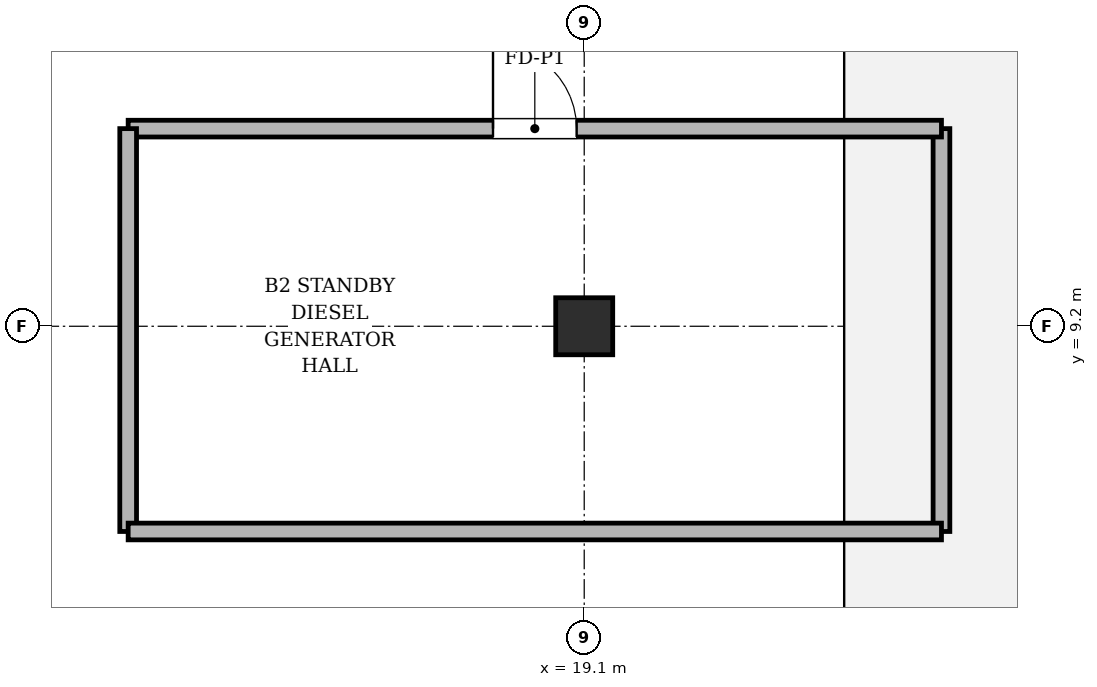
"""IFC4 building model, lengths in metres.
Left out: names, types, materials, properties, quantities, classifications, styles, units other than length and angle.
Written with IfcOpenShell. Run it as: python <this file> out.ifc"""

import sys

from ifc_helpers import new_model, si_unit, direction, frame, frame_2d, origin, origin_2d, place, context, subcontext, project, spatial, rectangle, circle, extrude, element, fill, save


model = new_model("IFC4")
c1 = context("Model", 3, precision=1e-05, world=origin(), true_north=direction((0.0, 1.0)))
c2 = subcontext(c1, "Body", "Model", "MODEL_VIEW")
j1 = project(units=[si_unit("LENGTHUNIT", "METRE"), si_unit("PLANEANGLEUNIT", "RADIAN")], contexts=[c1])
p1 = place(None, origin())
s1 = spatial("IfcSite", under=j1, at=p1, CompositionType="ELEMENT")
p2 = place(p1, origin())
s2 = spatial("IfcBuilding", under=s1, at=p2, CompositionType="ELEMENT")
p3 = place(p2, frame((0.0, 0.0, -9.6)))
s3 = spatial("IfcBuildingStorey", under=s2, at=p3, CompositionType="ELEMENT", Elevation=-9.6)
p4 = place(p3, frame((19.1, 9.2, 0.0), z_axis=(0.0, 0.0, 1.0), x_axis=(1.0, 0.0, 0.0)))
e1 = element("IfcColumn", 1, at=p4, inside=s3, PredefinedType="PILASTER", context=c2, shape_type="SweptSolid", body=[
    extrude(circle(Radius=0.375, at=origin_2d()), origin(), (0.0, 0.0, 1.0), 4.8),
])
p5 = place(p3, frame((23.8, 6.5, 0.0), z_axis=(0.0, 0.0, 1.0), x_axis=(0.0, 1.0, 0.0)))
e2 = element("IfcWall", 2, at=p5, inside=s3, PredefinedType="SOLIDWALL", context=c2, shape_type="SweptSolid", body=[
    extrude(rectangle(XDim=5.3, YDim=0.22, at=frame_2d((2.65, 0.0))), origin(), (0.0, 0.0, 1.0), 3.814),
])
p6 = place(p3, frame((23.8, 11.8, 0.0), z_axis=(0.0, 0.0, 1.0), x_axis=(-1.0, 0.0, 0.0)))
e3 = element("IfcWall", 3, at=p6, inside=s3, PredefinedType="SOLIDWALL", context=c2, shape_type="SweptSolid", body=[
    extrude(rectangle(XDim=10.7, YDim=0.22, at=frame_2d((5.35, 0.0))), origin(), (0.0, 0.0, 1.0), 3.814),
])
p7 = place(p6, frame((4.8, 0.0, 0.0)))
e4 = element("IfcOpeningElement", 4, at=p7, cuts=e3, PredefinedType="OPENING", context=c2, shape_type="SweptSolid", body=[
    extrude(rectangle(XDim=1.1, YDim=2.2, at=frame_2d((0.55, 1.1))), frame((0.0, 0.12, 0.0), z_axis=(0.0, -1.0, 0.0), x_axis=(1.0, 0.0, 0.0)), (0.0, 0.0, 1.0), 0.24),
])
p8 = place(p3, frame((13.1, 11.8, 0.0), z_axis=(0.0, 0.0, 1.0), x_axis=(0.0, -1.0, 0.0)))
e5 = element("IfcWall", 5, at=p8, inside=s3, PredefinedType="SOLIDWALL", context=c2, shape_type="SweptSolid", body=[
    extrude(rectangle(XDim=5.3, YDim=0.22, at=frame_2d((2.65, 0.0))), origin(), (0.0, 0.0, 1.0), 3.814),
])
p9 = place(p3, frame((13.1, 6.5, 0.0), z_axis=(0.0, 0.0, 1.0), x_axis=(1.0, 0.0, 0.0)))
e6 = element("IfcWall", 6, at=p9, inside=s3, PredefinedType="SOLIDWALL", context=c2, shape_type="SweptSolid", body=[
    extrude(rectangle(XDim=10.7, YDim=0.22, at=frame_2d((5.35, 0.0))), origin(), (0.0, 0.0, 1.0), 3.814),
])
p10 = place(p7, origin())
e7 = element("IfcDoor", 7, at=p10, inside=s3, OperationType="SINGLE_SWING_RIGHT", PredefinedType="DOOR", context=c2, shape_type="SweptSolid", body=[
    extrude(rectangle(XDim=1.1, YDim=2.2, at=frame_2d((0.55, 1.1))), frame((0.0, 0.025, 0.0), z_axis=(0.0, -1.0, 0.0), x_axis=(1.0, 0.0, 0.0)), (0.0, 0.0, 1.0), 0.05),
])
fill(e4, e7)
save(model, sys.argv[1])
